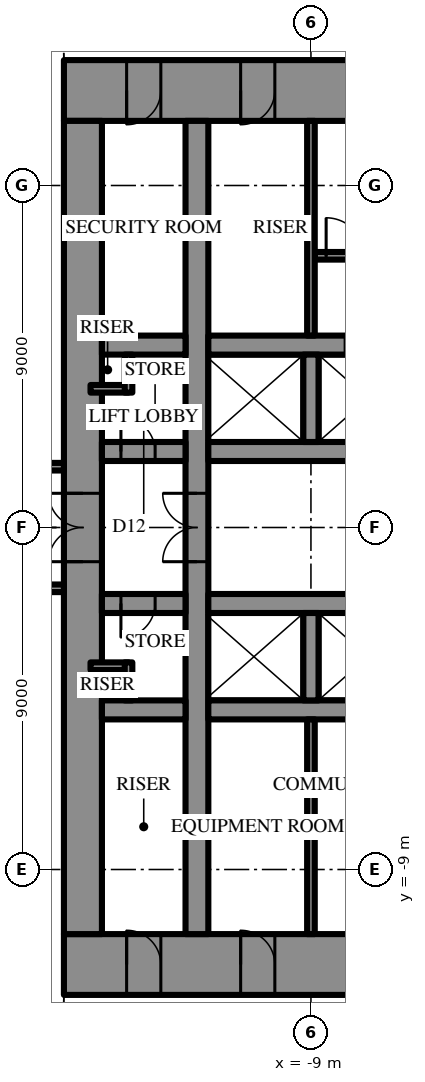
"""IFC4 building model, lengths in metres.
Left out: names, types, materials, properties, quantities, classifications, styles, units other than length and angle.
Written with IfcOpenShell. Run it as: python <this file> out.ifc"""

import sys

from ifc_helpers import new_model, si_unit, direction, frame, frame_2d, origin, place, context, subcontext, project, spatial, rectangle, extrude, element, fill, save


model = new_model("IFC4")
c1 = context("Model", 3, precision=1e-05, world=origin(), true_north=direction((0.0, 1.0)))
c2 = subcontext(c1, "Body", "Model", "MODEL_VIEW")
j1 = project(units=[si_unit("LENGTHUNIT", "METRE"), si_unit("PLANEANGLEUNIT", "RADIAN")], contexts=[c1])
p1 = place(None, origin())
s1 = spatial("IfcSite", under=j1, at=p1, CompositionType="ELEMENT")
p2 = place(p1, origin())
s2 = spatial("IfcBuilding", under=s1, at=p2, CompositionType="ELEMENT")
p3 = place(p2, frame((0.0, 0.0, 291.1)))
s3 = spatial("IfcBuildingStorey", under=s2, at=p3, CompositionType="ELEMENT", Elevation=291.1)
p4 = place(p3, frame((-15.5, 11.5, 0.0), z_axis=(0.0, 0.0, 1.0), x_axis=(1.0, 0.0, 0.0)))
e1 = element("IfcWall", 1, at=p4, inside=s3, PredefinedType="SHEAR", context=c2, shape_type="SweptSolid", body=[
    extrude(rectangle(XDim=31.0, YDim=1.6, at=frame_2d((15.5, 0.0))), origin(), (0.0, 0.0, 1.0), 4.2),
])
p5 = place(p4, frame((16.35, 0.0, 0.0)))
e2 = element("IfcOpeningElement", 2, at=p5, cuts=e1, PredefinedType="OPENING", context=c2, shape_type="SweptSolid", body=[
    extrude(rectangle(XDim=0.9, YDim=2.2, at=frame_2d((0.45, 1.1))), frame((0.0, 0.81, 0.0), z_axis=(0.0, -1.0, 0.0), x_axis=(1.0, 0.0, 0.0)), (0.0, 0.0, 1.0), 1.62),
])
p6 = place(p4, frame((19.35, 0.0, 0.0)))
e3 = element("IfcOpeningElement", 3, at=p6, cuts=e1, PredefinedType="OPENING", context=c2, shape_type="SweptSolid", body=[
    extrude(rectangle(XDim=0.9, YDim=2.2, at=frame_2d((0.45, 1.1))), frame((0.0, 0.81, 0.0), z_axis=(0.0, -1.0, 0.0), x_axis=(1.0, 0.0, 0.0)), (0.0, 0.0, 1.0), 1.62),
])
p7 = place(p4, frame((22.4, 0.0, 0.0)))
e4 = element("IfcOpeningElement", 4, at=p7, cuts=e1, PredefinedType="OPENING", context=c2, shape_type="SweptSolid", body=[
    extrude(rectangle(XDim=1.0, YDim=2.2, at=frame_2d((0.5, 1.1))), frame((0.0, 0.81, 0.0), z_axis=(0.0, -1.0, 0.0), x_axis=(1.0, 0.0, 0.0)), (0.0, 0.0, 1.0), 1.62),
])
p8 = place(p4, frame((1.65, 0.0, 0.0)))
e5 = element("IfcOpeningElement", 5, at=p8, cuts=e1, PredefinedType="OPENING", context=c2, shape_type="SweptSolid", body=[
    extrude(rectangle(XDim=0.9, YDim=2.2, at=frame_2d((0.45, 1.1))), frame((0.0, 0.81, 0.0), z_axis=(0.0, -1.0, 0.0), x_axis=(1.0, 0.0, 0.0)), (0.0, 0.0, 1.0), 1.62),
])
p9 = place(p4, frame((4.65, 0.0, 0.0)))
e6 = element("IfcOpeningElement", 6, at=p9, cuts=e1, PredefinedType="OPENING", context=c2, shape_type="SweptSolid", body=[
    extrude(rectangle(XDim=0.9, YDim=2.2, at=frame_2d((0.45, 1.1))), frame((0.0, 0.81, 0.0), z_axis=(0.0, -1.0, 0.0), x_axis=(1.0, 0.0, 0.0)), (0.0, 0.0, 1.0), 1.62),
])
p10 = place(p4, frame((25.45, 0.0, 0.0)))
e7 = element("IfcOpeningElement", 7, at=p10, cuts=e1, PredefinedType="OPENING", context=c2, shape_type="SweptSolid", body=[
    extrude(rectangle(XDim=0.9, YDim=2.2, at=frame_2d((0.45, 1.1))), frame((0.0, 0.81, 0.0), z_axis=(0.0, -1.0, 0.0), x_axis=(1.0, 0.0, 0.0)), (0.0, 0.0, 1.0), 1.62),
])
p11 = place(p4, frame((28.45, 0.0, 0.0)))
e8 = element("IfcOpeningElement", 8, at=p11, cuts=e1, PredefinedType="OPENING", context=c2, shape_type="SweptSolid", body=[
    extrude(rectangle(XDim=0.9, YDim=2.2, at=frame_2d((0.45, 1.1))), frame((0.0, 0.81, 0.0), z_axis=(0.0, -1.0, 0.0), x_axis=(1.0, 0.0, 0.0)), (0.0, 0.0, 1.0), 1.62),
])
p12 = place(p3, frame((15.5, -11.5, 0.0), z_axis=(0.0, 0.0, 1.0), x_axis=(-1.0, 0.0, 0.0)))
e9 = element("IfcWall", 9, at=p12, inside=s3, PredefinedType="SHEAR", context=c2, shape_type="SweptSolid", body=[
    extrude(rectangle(XDim=31.0, YDim=1.6, at=frame_2d((15.5, 0.0))), origin(), (0.0, 0.0, 1.0), 4.2),
])
p13 = place(p12, frame((16.35, 0.0, 0.0)))
e10 = element("IfcOpeningElement", 10, at=p13, cuts=e9, PredefinedType="OPENING", context=c2, shape_type="SweptSolid", body=[
    extrude(rectangle(XDim=0.9, YDim=2.2, at=frame_2d((0.45, 1.1))), frame((0.0, 0.81, 0.0), z_axis=(0.0, -1.0, 0.0), x_axis=(1.0, 0.0, 0.0)), (0.0, 0.0, 1.0), 1.62),
])
p14 = place(p12, frame((19.35, 0.0, 0.0)))
e11 = element("IfcOpeningElement", 11, at=p14, cuts=e9, PredefinedType="OPENING", context=c2, shape_type="SweptSolid", body=[
    extrude(rectangle(XDim=0.9, YDim=2.2, at=frame_2d((0.45, 1.1))), frame((0.0, 0.81, 0.0), z_axis=(0.0, -1.0, 0.0), x_axis=(1.0, 0.0, 0.0)), (0.0, 0.0, 1.0), 1.62),
])
p15 = place(p12, frame((22.4, 0.0, 0.0)))
e12 = element("IfcOpeningElement", 12, at=p15, cuts=e9, PredefinedType="OPENING", context=c2, shape_type="SweptSolid", body=[
    extrude(rectangle(XDim=1.0, YDim=2.2, at=frame_2d((0.5, 1.1))), frame((0.0, 0.81, 0.0), z_axis=(0.0, -1.0, 0.0), x_axis=(1.0, 0.0, 0.0)), (0.0, 0.0, 1.0), 1.62),
])
p16 = place(p12, frame((1.65, 0.0, 0.0)))
e13 = element("IfcOpeningElement", 13, at=p16, cuts=e9, PredefinedType="OPENING", context=c2, shape_type="SweptSolid", body=[
    extrude(rectangle(XDim=0.9, YDim=2.2, at=frame_2d((0.45, 1.1))), frame((0.0, 0.81, 0.0), z_axis=(0.0, -1.0, 0.0), x_axis=(1.0, 0.0, 0.0)), (0.0, 0.0, 1.0), 1.62),
])
p17 = place(p12, frame((4.65, 0.0, 0.0)))
e14 = element("IfcOpeningElement", 14, at=p17, cuts=e9, PredefinedType="OPENING", context=c2, shape_type="SweptSolid", body=[
    extrude(rectangle(XDim=0.9, YDim=2.2, at=frame_2d((0.45, 1.1))), frame((0.0, 0.81, 0.0), z_axis=(0.0, -1.0, 0.0), x_axis=(1.0, 0.0, 0.0)), (0.0, 0.0, 1.0), 1.62),
])
p18 = place(p12, frame((25.45, 0.0, 0.0)))
e15 = element("IfcOpeningElement", 15, at=p18, cuts=e9, PredefinedType="OPENING", context=c2, shape_type="SweptSolid", body=[
    extrude(rectangle(XDim=0.9, YDim=2.2, at=frame_2d((0.45, 1.1))), frame((0.0, 0.81, 0.0), z_axis=(0.0, -1.0, 0.0), x_axis=(1.0, 0.0, 0.0)), (0.0, 0.0, 1.0), 1.62),
])
p19 = place(p12, frame((28.45, 0.0, 0.0)))
e16 = element("IfcOpeningElement", 16, at=p19, cuts=e9, PredefinedType="OPENING", context=c2, shape_type="SweptSolid", body=[
    extrude(rectangle(XDim=0.9, YDim=2.2, at=frame_2d((0.45, 1.1))), frame((0.0, 0.81, 0.0), z_axis=(0.0, -1.0, 0.0), x_axis=(1.0, 0.0, 0.0)), (0.0, 0.0, 1.0), 1.62),
])
p20 = place(p3, frame((-15.0, 10.7, 0.0), z_axis=(0.0, 0.0, 1.0), x_axis=(0.0, -1.0, 0.0)))
e17 = element("IfcWall", 17, at=p20, inside=s3, PredefinedType="SHEAR", context=c2, shape_type="SweptSolid", body=[
    extrude(rectangle(XDim=21.4, YDim=1.0, at=frame_2d((10.7, 0.0))), origin(), (0.0, 0.0, 1.0), 4.2),
])
p21 = place(p20, frame((9.8, 0.0, 0.0)))
e18 = element("IfcOpeningElement", 18, at=p21, cuts=e17, PredefinedType="OPENING", context=c2, shape_type="SweptSolid", body=[
    extrude(rectangle(XDim=1.8, YDim=2.4, at=frame_2d((0.9, 1.2))), frame((0.0, 0.51, 0.0), z_axis=(0.0, -1.0, 0.0), x_axis=(1.0, 0.0, 0.0)), (0.0, 0.0, 1.0), 1.02),
])
p22 = place(p3, frame((-12.0, -10.7, 0.0), z_axis=(0.0, 0.0, 1.0), x_axis=(0.0, 1.0, 0.0)))
e19 = element("IfcWall", 19, at=p22, inside=s3, PredefinedType="SHEAR", context=c2, shape_type="SweptSolid", body=[
    extrude(rectangle(XDim=21.4, YDim=0.6, at=frame_2d((10.7, 0.0))), origin(), (0.0, 0.0, 1.0), 4.2),
])
p23 = place(p22, frame((9.8, 0.0, 0.0)))
e20 = element("IfcOpeningElement", 20, at=p23, cuts=e19, PredefinedType="OPENING", context=c2, shape_type="SweptSolid", body=[
    extrude(rectangle(XDim=1.8, YDim=2.4, at=frame_2d((0.9, 1.2))), frame((0.0, 0.31, 0.0), z_axis=(0.0, -1.0, 0.0), x_axis=(1.0, 0.0, 0.0)), (0.0, 0.0, 1.0), 0.62),
])
p24 = place(p3, frame((-14.5, 2.0, 0.0), z_axis=(0.0, 0.0, 1.0), x_axis=(1.0, 0.0, 0.0)))
e21 = element("IfcWall", 21, at=p24, inside=s3, PredefinedType="SHEAR", context=c2, shape_type="SweptSolid", body=[
    extrude(rectangle(XDim=2.2, YDim=0.5, at=frame_2d((1.1, 0.0))), origin(), (0.0, 0.0, 1.0), 4.2),
])
p25 = place(p24, frame((0.5, 0.0, 0.0)))
e22 = element("IfcOpeningElement", 22, at=p25, cuts=e21, PredefinedType="OPENING", context=c2, shape_type="SweptSolid", body=[
    extrude(rectangle(XDim=0.9, YDim=2.2, at=frame_2d((0.45, 1.1))), frame((0.0, 0.26, 0.0), z_axis=(0.0, -1.0, 0.0), x_axis=(1.0, 0.0, 0.0)), (0.0, 0.0, 1.0), 0.52),
])
p26 = place(p3, frame((-11.7, 2.0, 0.0), z_axis=(0.0, 0.0, 1.0), x_axis=(1.0, 0.0, 0.0)))
e23 = element("IfcWall", 23, at=p26, inside=s3, PredefinedType="SHEAR", context=c2, shape_type="SweptSolid", body=[
    extrude(rectangle(XDim=5.9, YDim=0.5, at=frame_2d((2.95, 0.0))), origin(), (0.0, 0.0, 1.0), 4.2),
])
p27 = place(p3, frame((-14.5, 4.8, 0.0), z_axis=(0.0, 0.0, 1.0), x_axis=(1.0, 0.0, 0.0)))
e24 = element("IfcWall", 24, at=p27, inside=s3, PredefinedType="SHEAR", context=c2, shape_type="SweptSolid", body=[
    extrude(rectangle(XDim=2.2, YDim=0.5, at=frame_2d((1.1, 0.0))), origin(), (0.0, 0.0, 1.0), 4.2),
])
p28 = place(p3, frame((-11.7, 4.8, 0.0), z_axis=(0.0, 0.0, 1.0), x_axis=(1.0, 0.0, 0.0)))
e25 = element("IfcWall", 25, at=p28, inside=s3, PredefinedType="SHEAR", context=c2, shape_type="SweptSolid", body=[
    extrude(rectangle(XDim=23.4, YDim=0.5, at=frame_2d((11.7, 0.0))), origin(), (0.0, 0.0, 1.0), 4.2),
])
p29 = place(p28, frame((6.6, 0.0, 0.0)))
e26 = element("IfcOpeningElement", 26, at=p29, cuts=e25, PredefinedType="OPENING", context=c2, shape_type="SweptSolid", body=[
    extrude(rectangle(XDim=1.2, YDim=2.2, at=frame_2d((0.6, 1.1))), frame((0.0, 0.26, 0.0), z_axis=(0.0, -1.0, 0.0), x_axis=(1.0, 0.0, 0.0)), (0.0, 0.0, 1.0), 0.52),
])
p30 = place(p28, frame((3.6, 0.0, 0.0)))
e27 = element("IfcOpeningElement", 27, at=p30, cuts=e25, PredefinedType="OPENING", context=c2, shape_type="SweptSolid", body=[
    extrude(rectangle(XDim=1.2, YDim=2.2, at=frame_2d((0.6, 1.1))), frame((0.0, 0.26, 0.0), z_axis=(0.0, -1.0, 0.0), x_axis=(1.0, 0.0, 0.0)), (0.0, 0.0, 1.0), 0.52),
])
p31 = place(p3, frame((-9.0, 2.25, 0.0), z_axis=(0.0, 0.0, 1.0), x_axis=(0.0, 1.0, 0.0)))
e28 = element("IfcWall", 28, at=p31, inside=s3, PredefinedType="SHEAR", context=c2, shape_type="SweptSolid", body=[
    extrude(rectangle(XDim=2.3, YDim=0.4, at=frame_2d((1.15, 0.0))), origin(), (0.0, 0.0, 1.0), 4.2),
])
p32 = place(p3, frame((-8.9, 7.15, 0.0), z_axis=(0.0, 0.0, 1.0), x_axis=(1.0, 0.0, 0.0)))
e29 = element("IfcWall", 29, at=p32, inside=s3, PredefinedType="SHEAR", context=c2, shape_type="SweptSolid", body=[
    extrude(rectangle(XDim=8.6, YDim=0.2, at=frame_2d((4.3, 0.0))), origin(), (0.0, 0.0, 1.0), 4.2),
])
p33 = place(p32, frame((0.3, 0.0, 0.0)))
e30 = element("IfcOpeningElement", 30, at=p33, cuts=e29, PredefinedType="OPENING", context=c2, shape_type="SweptSolid", body=[
    extrude(rectangle(XDim=1.0, YDim=2.2, at=frame_2d((0.5, 1.1))), frame((0.0, 0.11, 0.0), z_axis=(0.0, -1.0, 0.0), x_axis=(1.0, 0.0, 0.0)), (0.0, 0.0, 1.0), 0.22),
])
p34 = place(p3, frame((3.2, -2.0, 0.0), z_axis=(0.0, 0.0, 1.0), x_axis=(-1.0, 0.0, 0.0)))
e31 = element("IfcWall", 31, at=p34, inside=s3, PredefinedType="SHEAR", context=c2, shape_type="SweptSolid", body=[
    extrude(rectangle(XDim=14.9, YDim=0.5, at=frame_2d((7.45, 0.0))), origin(), (0.0, 0.0, 1.0), 4.2),
])
p35 = place(p34, frame((1.15, 0.0, 0.0)))
e32 = element("IfcOpeningElement", 32, at=p35, cuts=e31, PredefinedType="OPENING", context=c2, shape_type="SweptSolid", body=[
    extrude(rectangle(XDim=1.1, YDim=2.2, at=frame_2d((0.55, 1.1))), frame((0.0, 0.26, 0.0), z_axis=(0.0, -1.0, 0.0), x_axis=(1.0, 0.0, 0.0)), (0.0, 0.0, 1.0), 0.52),
])
p36 = place(p34, frame((4.15, 0.0, 0.0)))
e33 = element("IfcOpeningElement", 33, at=p36, cuts=e31, PredefinedType="OPENING", context=c2, shape_type="SweptSolid", body=[
    extrude(rectangle(XDim=1.1, YDim=2.2, at=frame_2d((0.55, 1.1))), frame((0.0, 0.26, 0.0), z_axis=(0.0, -1.0, 0.0), x_axis=(1.0, 0.0, 0.0)), (0.0, 0.0, 1.0), 0.52),
])
p37 = place(p34, frame((7.15, 0.0, 0.0)))
e34 = element("IfcOpeningElement", 34, at=p37, cuts=e31, PredefinedType="OPENING", context=c2, shape_type="SweptSolid", body=[
    extrude(rectangle(XDim=1.1, YDim=2.2, at=frame_2d((0.55, 1.1))), frame((0.0, 0.26, 0.0), z_axis=(0.0, -1.0, 0.0), x_axis=(1.0, 0.0, 0.0)), (0.0, 0.0, 1.0), 0.52),
])
p38 = place(p34, frame((10.15, 0.0, 0.0)))
e35 = element("IfcOpeningElement", 35, at=p38, cuts=e31, PredefinedType="OPENING", context=c2, shape_type="SweptSolid", body=[
    extrude(rectangle(XDim=1.1, YDim=2.2, at=frame_2d((0.55, 1.1))), frame((0.0, 0.26, 0.0), z_axis=(0.0, -1.0, 0.0), x_axis=(1.0, 0.0, 0.0)), (0.0, 0.0, 1.0), 0.52),
])
p39 = place(p3, frame((-12.3, -2.0, 0.0), z_axis=(0.0, 0.0, 1.0), x_axis=(-1.0, 0.0, 0.0)))
e36 = element("IfcWall", 36, at=p39, inside=s3, PredefinedType="SHEAR", context=c2, shape_type="SweptSolid", body=[
    extrude(rectangle(XDim=2.2, YDim=0.5, at=frame_2d((1.1, 0.0))), origin(), (0.0, 0.0, 1.0), 4.2),
])
p40 = place(p39, frame((0.8, 0.0, 0.0)))
e37 = element("IfcOpeningElement", 37, at=p40, cuts=e36, PredefinedType="OPENING", context=c2, shape_type="SweptSolid", body=[
    extrude(rectangle(XDim=0.9, YDim=2.2, at=frame_2d((0.45, 1.1))), frame((0.0, 0.26, 0.0), z_axis=(0.0, -1.0, 0.0), x_axis=(1.0, 0.0, 0.0)), (0.0, 0.0, 1.0), 0.52),
])
p41 = place(p3, frame((11.7, -4.8, 0.0), z_axis=(0.0, 0.0, 1.0), x_axis=(-1.0, 0.0, 0.0)))
e38 = element("IfcWall", 38, at=p41, inside=s3, PredefinedType="SHEAR", context=c2, shape_type="SweptSolid", body=[
    extrude(rectangle(XDim=23.4, YDim=0.5, at=frame_2d((11.7, 0.0))), origin(), (0.0, 0.0, 1.0), 4.2),
])
p42 = place(p41, frame((6.6, 0.0, 0.0)))
e39 = element("IfcOpeningElement", 39, at=p42, cuts=e38, PredefinedType="OPENING", context=c2, shape_type="SweptSolid", body=[
    extrude(rectangle(XDim=1.2, YDim=2.2, at=frame_2d((0.6, 1.1))), frame((0.0, 0.26, 0.0), z_axis=(0.0, -1.0, 0.0), x_axis=(1.0, 0.0, 0.0)), (0.0, 0.0, 1.0), 0.52),
])
p43 = place(p41, frame((3.6, 0.0, 0.0)))
e40 = element("IfcOpeningElement", 40, at=p43, cuts=e38, PredefinedType="OPENING", context=c2, shape_type="SweptSolid", body=[
    extrude(rectangle(XDim=1.2, YDim=2.2, at=frame_2d((0.6, 1.1))), frame((0.0, 0.26, 0.0), z_axis=(0.0, -1.0, 0.0), x_axis=(1.0, 0.0, 0.0)), (0.0, 0.0, 1.0), 0.52),
])
p44 = place(p3, frame((-12.3, -4.8, 0.0), z_axis=(0.0, 0.0, 1.0), x_axis=(-1.0, 0.0, 0.0)))
e41 = element("IfcWall", 41, at=p44, inside=s3, PredefinedType="SHEAR", context=c2, shape_type="SweptSolid", body=[
    extrude(rectangle(XDim=2.2, YDim=0.5, at=frame_2d((1.1, 0.0))), origin(), (0.0, 0.0, 1.0), 4.2),
])
p45 = place(p3, frame((-9.0, -2.25, 0.0), z_axis=(0.0, 0.0, 1.0), x_axis=(0.0, -1.0, 0.0)))
e42 = element("IfcWall", 42, at=p45, inside=s3, PredefinedType="SHEAR", context=c2, shape_type="SweptSolid", body=[
    extrude(rectangle(XDim=2.3, YDim=0.4, at=frame_2d((1.15, 0.0))), origin(), (0.0, 0.0, 1.0), 4.2),
])
for number, where, z_axis, x_axis in (
    (43, (-9.0, 5.05, 0.0), (0.0, 0.0, 1.0), (0.0, 1.0, 0.0)),
    (44, (-9.0, -5.05, 0.0), (0.0, 0.0, 1.0), (0.0, -1.0, 0.0)),
):
    element("IfcWall", number, at=place(p3, frame(where, z_axis=z_axis, x_axis=x_axis)), inside=s3, PredefinedType="PARTITIONING", context=c2, shape_type="SweptSolid", body=[
        extrude(rectangle(XDim=5.65, YDim=0.2, at=frame_2d((2.825, 0.0))), origin(), (0.0, 0.0, 1.0), 4.0),
    ])
for number, where, z_axis, x_axis in (
    (45, (-14.8, 3.65, 0.0), (0.0, 0.0, 1.0), (1.0, 0.0, 0.0)),
    (46, (-13.8, 3.55, 0.0), (0.0, 0.0, 1.0), (0.0, 1.0, 0.0)),
    (47, (-13.8, -3.65, 0.0), (0.0, 0.0, 1.0), (-1.0, 0.0, 0.0)),
    (48, (-13.8, -3.55, 0.0), (0.0, 0.0, 1.0), (0.0, -1.0, 0.0)),
):
    element("IfcWall", number, at=place(p3, frame(where, z_axis=z_axis, x_axis=x_axis)), inside=s3, PredefinedType="PARTITIONING", context=c2, shape_type="SweptSolid", body=[
        extrude(rectangle(XDim=1.0, YDim=0.2, at=frame_2d((0.5, 0.0))), origin(), (0.0, 0.0, 1.0), 4.0),
    ])
p46 = place(p3, frame((-15.5, 1.6, 0.0), z_axis=(0.0, 0.0, 1.0), x_axis=(-1.0, 0.0, 0.0)))
e49 = element("IfcWall", 49, at=p46, inside=s3, PredefinedType="PARTITIONING", context=c2, shape_type="SweptSolid", body=[
    extrude(rectangle(XDim=10.7, YDim=0.2, at=frame_2d((5.35, 0.0))), origin(), (0.0, 0.0, 1.0), 4.0),
])
p47 = place(p46, frame((2.71, 0.0, 0.0)))
e50 = element("IfcOpeningElement", 50, at=p47, cuts=e49, PredefinedType="OPENING", context=c2, shape_type="SweptSolid", body=[
    extrude(rectangle(XDim=1.0, YDim=2.2, at=frame_2d((0.5, 1.1))), frame((0.0, 0.11, 0.0), z_axis=(0.0, -1.0, 0.0), x_axis=(1.0, 0.0, 0.0)), (0.0, 0.0, 1.0), 0.22),
])
p48 = place(p3, frame((-15.5, -1.6, 0.0), z_axis=(0.0, 0.0, 1.0), x_axis=(-1.0, 0.0, 0.0)))
e51 = element("IfcWall", 51, at=p48, inside=s3, PredefinedType="PARTITIONING", context=c2, shape_type="SweptSolid", body=[
    extrude(rectangle(XDim=10.7, YDim=0.2, at=frame_2d((5.35, 0.0))), origin(), (0.0, 0.0, 1.0), 4.0),
])
p49 = place(p48, frame((2.71, 0.0, 0.0)))
e52 = element("IfcOpeningElement", 52, at=p49, cuts=e51, PredefinedType="OPENING", context=c2, shape_type="SweptSolid", body=[
    extrude(rectangle(XDim=1.0, YDim=2.2, at=frame_2d((0.5, 1.1))), frame((0.0, 0.11, 0.0), z_axis=(0.0, -1.0, 0.0), x_axis=(1.0, 0.0, 0.0)), (0.0, 0.0, 1.0), 0.22),
])
p50 = place(p21, frame((1.8, 0.0, 0.0), z_axis=(0.0, 0.0, 1.0), x_axis=(-1.0, 0.0, 0.0)))
e53 = element("IfcDoor", 53, at=p50, inside=s3, OperationType="DOUBLE_DOOR_SINGLE_SWING", PredefinedType="DOOR", context=c2, shape_type="SweptSolid", body=[
    extrude(rectangle(XDim=1.8, YDim=2.4, at=frame_2d((0.9, 1.2))), frame((0.0, 0.025, 0.0), z_axis=(0.0, -1.0, 0.0), x_axis=(1.0, 0.0, 0.0)), (0.0, 0.0, 1.0), 0.05),
])
fill(e18, e53)
p51 = place(p33, origin())
e54 = element("IfcDoor", 54, at=p51, inside=s3, OperationType="SINGLE_SWING_RIGHT", PredefinedType="DOOR", context=c2, shape_type="SweptSolid", body=[
    extrude(rectangle(XDim=1.0, YDim=2.2, at=frame_2d((0.5, 1.1))), frame((0.0, 0.025, 0.0), z_axis=(0.0, -1.0, 0.0), x_axis=(1.0, 0.0, 0.0)), (0.0, 0.0, 1.0), 0.05),
])
fill(e30, e54)
p52 = place(p8, frame((0.9, 0.0, 0.0), z_axis=(0.0, 0.0, 1.0), x_axis=(-1.0, 0.0, 0.0)))
e55 = element("IfcDoor", 55, at=p52, inside=s3, OperationType="SINGLE_SWING_LEFT", PredefinedType="DOOR", context=c2, shape_type="SweptSolid", body=[
    extrude(rectangle(XDim=0.9, YDim=2.2, at=frame_2d((0.45, 1.1))), frame((0.0, 0.025, 0.0), z_axis=(0.0, -1.0, 0.0), x_axis=(1.0, 0.0, 0.0)), (0.0, 0.0, 1.0), 0.05),
])
fill(e5, e55)
p53 = place(p9, frame((0.9, 0.0, 0.0), z_axis=(0.0, 0.0, 1.0), x_axis=(-1.0, 0.0, 0.0)))
e56 = element("IfcDoor", 56, at=p53, inside=s3, OperationType="SINGLE_SWING_LEFT", PredefinedType="DOOR", context=c2, shape_type="SweptSolid", body=[
    extrude(rectangle(XDim=0.9, YDim=2.2, at=frame_2d((0.45, 1.1))), frame((0.0, 0.025, 0.0), z_axis=(0.0, -1.0, 0.0), x_axis=(1.0, 0.0, 0.0)), (0.0, 0.0, 1.0), 0.05),
])
fill(e6, e56)
p54 = place(p18, frame((0.9, 0.0, 0.0), z_axis=(0.0, 0.0, 1.0), x_axis=(-1.0, 0.0, 0.0)))
e57 = element("IfcDoor", 57, at=p54, inside=s3, OperationType="SINGLE_SWING_RIGHT", PredefinedType="DOOR", context=c2, shape_type="SweptSolid", body=[
    extrude(rectangle(XDim=0.9, YDim=2.2, at=frame_2d((0.45, 1.1))), frame((0.0, 0.025, 0.0), z_axis=(0.0, -1.0, 0.0), x_axis=(1.0, 0.0, 0.0)), (0.0, 0.0, 1.0), 0.05),
])
fill(e15, e57)
p55 = place(p19, frame((0.9, 0.0, 0.0), z_axis=(0.0, 0.0, 1.0), x_axis=(-1.0, 0.0, 0.0)))
e58 = element("IfcDoor", 58, at=p55, inside=s3, OperationType="SINGLE_SWING_RIGHT", PredefinedType="DOOR", context=c2, shape_type="SweptSolid", body=[
    extrude(rectangle(XDim=0.9, YDim=2.2, at=frame_2d((0.45, 1.1))), frame((0.0, 0.025, 0.0), z_axis=(0.0, -1.0, 0.0), x_axis=(1.0, 0.0, 0.0)), (0.0, 0.0, 1.0), 0.05),
])
fill(e16, e58)
p56 = place(p25, origin())
e59 = element("IfcDoor", 59, at=p56, inside=s3, OperationType="SINGLE_SWING_RIGHT", PredefinedType="DOOR", context=c2, shape_type="SweptSolid", body=[
    extrude(rectangle(XDim=0.9, YDim=2.2, at=frame_2d((0.45, 1.1))), frame((0.0, 0.025, 0.0), z_axis=(0.0, -1.0, 0.0), x_axis=(1.0, 0.0, 0.0)), (0.0, 0.0, 1.0), 0.05),
])
fill(e22, e59)
p57 = place(p40, origin())
e60 = element("IfcDoor", 60, at=p57, inside=s3, OperationType="SINGLE_SWING_LEFT", PredefinedType="DOOR", context=c2, shape_type="SweptSolid", body=[
    extrude(rectangle(XDim=0.9, YDim=2.2, at=frame_2d((0.45, 1.1))), frame((0.0, 0.025, 0.0), z_axis=(0.0, -1.0, 0.0), x_axis=(1.0, 0.0, 0.0)), (0.0, 0.0, 1.0), 0.05),
])
fill(e37, e60)
p58 = place(p23, origin())
e61 = element("IfcDoor", 61, at=p58, inside=s3, OperationType="DOUBLE_DOOR_SINGLE_SWING", PredefinedType="DOOR", context=c2, shape_type="SweptSolid", body=[
    extrude(rectangle(XDim=1.8, YDim=2.4, at=frame_2d((0.9, 1.2))), frame((0.0, 0.025, 0.0), z_axis=(0.0, -1.0, 0.0), x_axis=(1.0, 0.0, 0.0)), (0.0, 0.0, 1.0), 0.05),
])
fill(e20, e61)
save(model, sys.argv[1])
